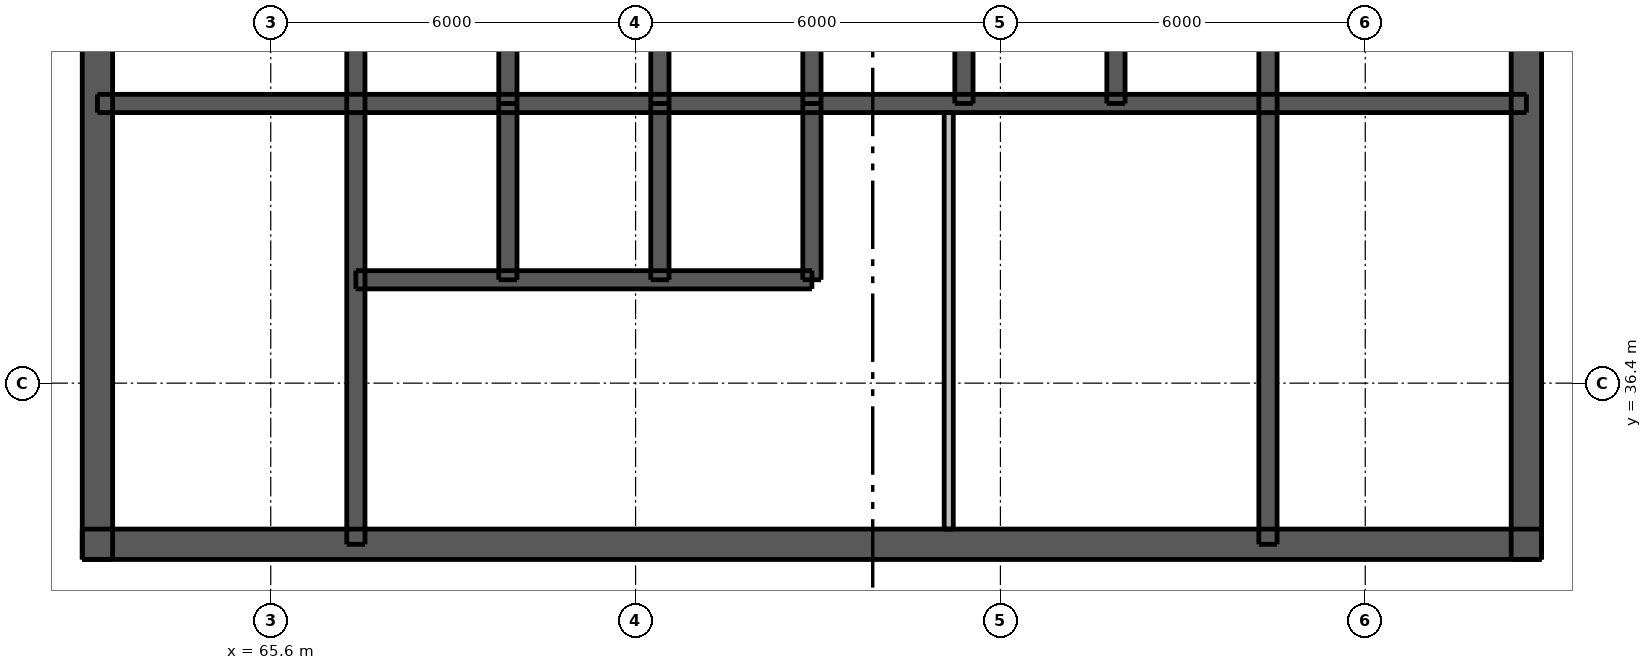
"""IFC4 building model, lengths in metres.
Left out: names, types, materials, properties, quantities, classifications, styles, units other than length and angle.
Written with IfcOpenShell. Run it as: python <this file> out.ifc"""

import sys

from ifc_helpers import new_model, si_unit, direction, frame, frame_2d, origin, place, context, subcontext, project, spatial, rectangle, extrude, element, fill, save


model = new_model("IFC4")
c1 = context("Model", 3, precision=1e-05, world=origin(), true_north=direction((0.0, 1.0)))
c2 = subcontext(c1, "Body", "Model", "MODEL_VIEW")
j1 = project(units=[si_unit("LENGTHUNIT", "METRE"), si_unit("PLANEANGLEUNIT", "RADIAN")], contexts=[c1])
p1 = place(None, origin())
s1 = spatial("IfcSite", under=j1, at=p1, CompositionType="ELEMENT")
p2 = place(p1, origin())
s2 = spatial("IfcBuilding", under=s1, at=p2, CompositionType="ELEMENT")
p3 = place(p2, frame((0.0, 0.0, 238.9)))
s3 = spatial("IfcBuildingStorey", under=s2, at=p3, CompositionType="ELEMENT", Elevation=238.9)
p4 = place(p3, frame((62.5, 33.75, 0.0), z_axis=(0.0, 0.0, 1.0), x_axis=(1.0, 0.0, 0.0)))
e1 = element("IfcWall", 1, at=p4, inside=s3, PredefinedType="SHEAR", context=c2, shape_type="SweptSolid", body=[
    extrude(rectangle(XDim=24.0, YDim=0.5, at=frame_2d((12.0, 0.0))), origin(), (0.0, 0.0, 1.0), 3.05),
])
p5 = place(p4, frame((1.875, 0.0, 0.0)))
e2 = element("IfcOpeningElement", 2, at=p5, cuts=e1, PredefinedType="OPENING", context=c2, shape_type="SweptSolid", body=[
    extrude(rectangle(XDim=1.1, YDim=2.1, at=frame_2d((0.55, 1.05))), frame((0.0, 0.26, 0.0), z_axis=(0.0, -1.0, 0.0), x_axis=(1.0, 0.0, 0.0)), (0.0, 0.0, 1.0), 0.52),
])
p6 = place(p4, frame((21.025, 0.0, 0.0)))
e3 = element("IfcOpeningElement", 3, at=p6, cuts=e1, PredefinedType="OPENING", context=c2, shape_type="SweptSolid", body=[
    extrude(rectangle(XDim=1.1, YDim=2.1, at=frame_2d((0.55, 1.05))), frame((0.0, 0.26, 0.0), z_axis=(0.0, -1.0, 0.0), x_axis=(1.0, 0.0, 0.0)), (0.0, 0.0, 1.0), 0.52),
])
p7 = place(p4, frame((8.0, 0.0, 0.0)))
e4 = element("IfcOpeningElement", 4, at=p7, cuts=e1, PredefinedType="OPENING", context=c2, shape_type="SweptSolid", body=[
    extrude(rectangle(XDim=1.1, YDim=2.1, at=frame_2d((0.55, 1.05))), frame((0.0, 0.26, 0.0), z_axis=(0.0, -1.0, 0.0), x_axis=(1.0, 0.0, 0.0)), (0.0, 0.0, 1.0), 0.52),
])
p8 = place(p4, frame((16.387, 0.0, 0.0)))
e5 = element("IfcOpeningElement", 5, at=p8, cuts=e1, PredefinedType="OPENING", context=c2, shape_type="SweptSolid", body=[
    extrude(rectangle(XDim=0.9, YDim=2.1, at=frame_2d((0.45, 1.05))), frame((0.0, 0.26, 0.0), z_axis=(0.0, -1.0, 0.0), x_axis=(1.0, 0.0, 0.0)), (0.0, 0.0, 1.0), 0.52),
])
p9 = place(p3, frame((62.75, 33.5, 0.0), z_axis=(0.0, 0.0, 1.0), x_axis=(0.0, 1.0, 0.0)))
e6 = element("IfcWall", 6, at=p9, inside=s3, PredefinedType="SHEAR", context=c2, shape_type="SweptSolid", body=[
    extrude(rectangle(XDim=24.0, YDim=0.5, at=frame_2d((12.0, 0.0))), origin(), (0.0, 0.0, 1.0), 3.05),
])
p10 = place(p9, frame((11.2, 0.0, 0.0)))
e7 = element("IfcOpeningElement", 7, at=p10, cuts=e6, PredefinedType="OPENING", context=c2, shape_type="SweptSolid", body=[
    extrude(rectangle(XDim=1.6, YDim=2.1, at=frame_2d((0.8, 1.05))), frame((0.0, 0.26, 0.0), z_axis=(0.0, -1.0, 0.0), x_axis=(1.0, 0.0, 0.0)), (0.0, 0.0, 1.0), 0.52),
])
p11 = place(p3, frame((86.25, 33.5, 0.0), z_axis=(0.0, 0.0, 1.0), x_axis=(0.0, 1.0, 0.0)))
e8 = element("IfcWall", 8, at=p11, inside=s3, PredefinedType="SHEAR", context=c2, shape_type="SweptSolid", body=[
    extrude(rectangle(XDim=24.0, YDim=0.5, at=frame_2d((12.0, 0.0))), origin(), (0.0, 0.0, 1.0), 3.05),
])
p12 = place(p11, frame((11.2, 0.0, 0.0)))
e9 = element("IfcOpeningElement", 9, at=p12, cuts=e8, PredefinedType="OPENING", context=c2, shape_type="SweptSolid", body=[
    extrude(rectangle(XDim=1.6, YDim=2.1, at=frame_2d((0.8, 1.05))), frame((0.0, 0.26, 0.0), z_axis=(0.0, -1.0, 0.0), x_axis=(1.0, 0.0, 0.0)), (0.0, 0.0, 1.0), 0.52),
])
p13 = place(p3, frame((62.75, 41.0, 0.0), z_axis=(0.0, 0.0, 1.0), x_axis=(1.0, 0.0, 0.0)))
e10 = element("IfcWall", 10, at=p13, inside=s3, PredefinedType="SHEAR", context=c2, shape_type="SweptSolid", body=[
    extrude(rectangle(XDim=23.5, YDim=0.3, at=frame_2d((11.75, 0.0))), origin(), (0.0, 0.0, 1.0), 3.05),
])
p14 = place(p3, frame((67.0, 33.75, 0.0), z_axis=(0.0, 0.0, 1.0), x_axis=(0.0, 1.0, 0.0)))
e11 = element("IfcWall", 11, at=p14, inside=s3, PredefinedType="SHEAR", context=c2, shape_type="SweptSolid", body=[
    extrude(rectangle(XDim=10.15, YDim=0.3, at=frame_2d((5.075, 0.0))), origin(), (0.0, 0.0, 1.0), 3.05),
])
p15 = place(p14, frame((0.45, 0.0, 0.0)))
e12 = element("IfcOpeningElement", 12, at=p15, cuts=e11, PredefinedType="OPENING", context=c2, shape_type="SweptSolid", body=[
    extrude(rectangle(XDim=1.1, YDim=2.1, at=frame_2d((0.55, 1.05))), frame((0.0, 0.16, 0.0), z_axis=(0.0, -1.0, 0.0), x_axis=(1.0, 0.0, 0.0)), (0.0, 0.0, 1.0), 0.32),
])
p16 = place(p3, frame((82.0, 33.75, 0.0), z_axis=(0.0, 0.0, 1.0), x_axis=(0.0, 1.0, 0.0)))
e13 = element("IfcWall", 13, at=p16, inside=s3, PredefinedType="SHEAR", context=c2, shape_type="SweptSolid", body=[
    extrude(rectangle(XDim=10.15, YDim=0.3, at=frame_2d((5.075, 0.0))), origin(), (0.0, 0.0, 1.0), 3.05),
])
for number, where, z_axis, x_axis in (
    (14, (69.5, 41.0, 0.0), (0.0, 0.0, 1.0), (0.0, 1.0, 0.0)),
    (15, (72.0, 41.0, 0.0), (0.0, 0.0, 1.0), (0.0, 1.0, 0.0)),
    (16, (74.5, 41.0, 0.0), (0.0, 0.0, 1.0), (0.0, 1.0, 0.0)),
    (17, (77.0, 41.0, 0.0), (0.0, 0.0, 1.0), (0.0, 1.0, 0.0)),
    (18, (79.5, 41.0, 0.0), (0.0, 0.0, 1.0), (0.0, 1.0, 0.0)),
):
    element("IfcWall", number, at=place(p3, frame(where, z_axis=z_axis, x_axis=x_axis)), inside=s3, PredefinedType="SHEAR", context=c2, shape_type="SweptSolid", body=[
        extrude(rectangle(XDim=2.9, YDim=0.3, at=frame_2d((1.45, 0.0))), origin(), (0.0, 0.0, 1.0), 3.05),
    ])
p17 = place(p3, frame((67.0, 38.1, 0.0), z_axis=(0.0, 0.0, 1.0), x_axis=(1.0, 0.0, 0.0)))
e19 = element("IfcWall", 19, at=p17, inside=s3, PredefinedType="SHEAR", context=c2, shape_type="SweptSolid", body=[
    extrude(rectangle(XDim=7.5, YDim=0.3, at=frame_2d((3.75, 0.0))), origin(), (0.0, 0.0, 1.0), 3.05),
])
p18 = place(p17, frame((0.7, 0.0, 0.0)))
e20 = element("IfcOpeningElement", 20, at=p18, cuts=e19, PredefinedType="OPENING", context=c2, shape_type="SweptSolid", body=[
    extrude(rectangle(XDim=1.1, YDim=2.1, at=frame_2d((0.55, 1.05))), frame((0.0, 0.16, 0.0), z_axis=(0.0, -1.0, 0.0), x_axis=(1.0, 0.0, 0.0)), (0.0, 0.0, 1.0), 0.32),
])
p19 = place(p17, frame((3.2, 0.0, 0.0)))
e21 = element("IfcOpeningElement", 21, at=p19, cuts=e19, PredefinedType="OPENING", context=c2, shape_type="SweptSolid", body=[
    extrude(rectangle(XDim=1.1, YDim=2.1, at=frame_2d((0.55, 1.05))), frame((0.0, 0.16, 0.0), z_axis=(0.0, -1.0, 0.0), x_axis=(1.0, 0.0, 0.0)), (0.0, 0.0, 1.0), 0.32),
])
p20 = place(p17, frame((5.65, 0.0, 0.0)))
e22 = element("IfcOpeningElement", 22, at=p20, cuts=e19, PredefinedType="OPENING", context=c2, shape_type="SweptSolid", body=[
    extrude(rectangle(XDim=1.2, YDim=2.1, at=frame_2d((0.6, 1.05))), frame((0.0, 0.16, 0.0), z_axis=(0.0, -1.0, 0.0), x_axis=(1.0, 0.0, 0.0)), (0.0, 0.0, 1.0), 0.32),
])
for number, where, z_axis, x_axis in (
    (23, (69.5, 38.1, 0.0), (0.0, 0.0, 1.0), (0.0, 1.0, 0.0)),
    (24, (72.0, 38.1, 0.0), (0.0, 0.0, 1.0), (0.0, 1.0, 0.0)),
    (25, (74.5, 38.1, 0.0), (0.0, 0.0, 1.0), (0.0, 1.0, 0.0)),
):
    element("IfcWall", number, at=place(p3, frame(where, z_axis=z_axis, x_axis=x_axis)), inside=s3, PredefinedType="SHEAR", context=c2, shape_type="SweptSolid", body=[
        extrude(rectangle(XDim=2.9, YDim=0.3, at=frame_2d((1.45, 0.0))), origin(), (0.0, 0.0, 1.0), 3.05),
    ])
p21 = place(p3, frame((76.75, 34.0, 0.0), z_axis=(0.0, 0.0, 1.0), x_axis=(0.0, 1.0, 0.0)))
e26 = element("IfcWall", 26, at=p21, inside=s3, PredefinedType="PLUMBINGWALL", context=c2, shape_type="SweptSolid", body=[
    extrude(rectangle(XDim=6.85, YDim=0.15, at=frame_2d((3.425, 0.0))), origin(), (0.0, 0.0, 1.0), 3.05),
])
p22 = place(p5, origin())
e27 = element("IfcDoor", 27, at=p22, inside=s3, OperationType="SINGLE_SWING_LEFT", PredefinedType="DOOR", context=c2, shape_type="SweptSolid", body=[
    extrude(rectangle(XDim=1.1, YDim=2.1, at=frame_2d((0.55, 1.05))), frame((0.0, 0.237, 0.0), z_axis=(0.0, -1.0, 0.0), x_axis=(1.0, 0.0, 0.0)), (0.0, 0.0, 1.0), 0.05),
])
fill(e2, e27)
p23 = place(p6, origin())
e28 = element("IfcDoor", 28, at=p23, inside=s3, OperationType="SINGLE_SWING_RIGHT", PredefinedType="DOOR", context=c2, shape_type="SweptSolid", body=[
    extrude(rectangle(XDim=1.1, YDim=2.1, at=frame_2d((0.55, 1.05))), frame((0.0, 0.237, 0.0), z_axis=(0.0, -1.0, 0.0), x_axis=(1.0, 0.0, 0.0)), (0.0, 0.0, 1.0), 0.05),
])
fill(e3, e28)
p24 = place(p7, origin())
e29 = element("IfcDoor", 29, at=p24, inside=s3, OperationType="SINGLE_SWING_LEFT", PredefinedType="DOOR", context=c2, shape_type="SweptSolid", body=[
    extrude(rectangle(XDim=1.1, YDim=2.1, at=frame_2d((0.55, 1.05))), frame((0.0, 0.237, 0.0), z_axis=(0.0, -1.0, 0.0), x_axis=(1.0, 0.0, 0.0)), (0.0, 0.0, 1.0), 0.05),
])
fill(e4, e29)
p25 = place(p15, origin())
e30 = element("IfcDoor", 30, at=p25, inside=s3, OperationType="SINGLE_SWING_RIGHT", PredefinedType="DOOR", context=c2, shape_type="SweptSolid", body=[
    extrude(rectangle(XDim=1.1, YDim=2.1, at=frame_2d((0.55, 1.05))), frame((0.0, -0.087, 0.0), z_axis=(0.0, -1.0, 0.0), x_axis=(1.0, 0.0, 0.0)), (0.0, 0.0, 1.0), 0.05),
])
fill(e12, e30)
p26 = place(p8, origin())
e31 = element("IfcDoor", 31, at=p26, inside=s3, OperationType="SINGLE_SWING_LEFT", PredefinedType="DOOR", context=c2, shape_type="SweptSolid", body=[
    extrude(rectangle(XDim=0.9, YDim=2.1, at=frame_2d((0.45, 1.05))), frame((0.0, 0.237, 0.0), z_axis=(0.0, -1.0, 0.0), x_axis=(1.0, 0.0, 0.0)), (0.0, 0.0, 1.0), 0.05),
])
fill(e5, e31)
p27 = place(p18, origin())
e32 = element("IfcDoor", 32, at=p27, inside=s3, OperationType="DOUBLE_DOOR_SLIDING", PredefinedType="DOOR", context=c2, shape_type="SweptSolid", body=[
    extrude(rectangle(XDim=1.1, YDim=2.1, at=frame_2d((0.55, 1.05))), frame((0.0, 0.025, 0.0), z_axis=(0.0, -1.0, 0.0), x_axis=(1.0, 0.0, 0.0)), (0.0, 0.0, 1.0), 0.05),
])
fill(e20, e32)
p28 = place(p19, origin())
e33 = element("IfcDoor", 33, at=p28, inside=s3, OperationType="DOUBLE_DOOR_SLIDING", PredefinedType="DOOR", context=c2, shape_type="SweptSolid", body=[
    extrude(rectangle(XDim=1.1, YDim=2.1, at=frame_2d((0.55, 1.05))), frame((0.0, 0.025, 0.0), z_axis=(0.0, -1.0, 0.0), x_axis=(1.0, 0.0, 0.0)), (0.0, 0.0, 1.0), 0.05),
])
fill(e21, e33)
p29 = place(p20, origin())
e34 = element("IfcDoor", 34, at=p29, inside=s3, OperationType="DOUBLE_DOOR_SLIDING", PredefinedType="DOOR", context=c2, shape_type="SweptSolid", body=[
    extrude(rectangle(XDim=1.2, YDim=2.1, at=frame_2d((0.6, 1.05))), frame((0.0, 0.025, 0.0), z_axis=(0.0, -1.0, 0.0), x_axis=(1.0, 0.0, 0.0)), (0.0, 0.0, 1.0), 0.05),
])
fill(e22, e34)
save(model, sys.argv[1])
